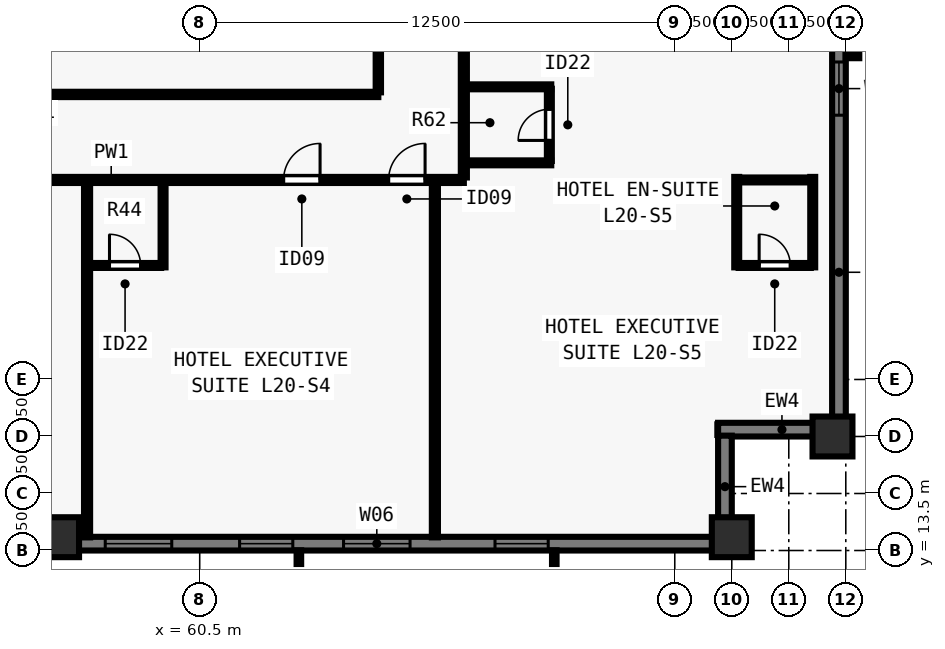
"""IFC4 building model, lengths in metres.
Left out: names, types, materials, properties, quantities, classifications, styles, units other than length and angle.
Written with IfcOpenShell. Run it as: python <this file> out.ifc"""

import sys

from ifc_helpers import new_model, si_unit, direction, frame, frame_2d, origin, origin_2d, place, context, subcontext, project, spatial, rectangle, extrude, element, fill, save


model = new_model("IFC4")
c1 = context("Model", 3, precision=1e-05, world=origin(), true_north=direction((0.0, 1.0)))
c2 = subcontext(c1, "Body", "Model", "MODEL_VIEW")
j1 = project(units=[si_unit("LENGTHUNIT", "METRE"), si_unit("PLANEANGLEUNIT", "RADIAN")], contexts=[c1])
p1 = place(None, origin())
s1 = spatial("IfcSite", under=j1, at=p1, CompositionType="ELEMENT")
p2 = place(p1, origin())
s2 = spatial("IfcBuilding", under=s1, at=p2, CompositionType="ELEMENT")
p3 = place(p2, frame((0.0, 0.0, 76.0)))
s3 = spatial("IfcBuildingStorey", under=s2, at=p3, CompositionType="ELEMENT", Elevation=76.0)
for number, where, z_axis, x_axis in (
    (1, (56.8, 13.85, 0.0), (0.0, 0.0, 1.0), (1.0, 0.0, 0.0)),
    (2, (74.5, 13.85, 0.0), (0.0, 0.0, 1.0), (1.0, 0.0, 0.0)),
    (3, (77.15, 16.5, 0.0), (0.0, 0.0, 1.0), (0.0, 1.0, 0.0)),
):
    element("IfcColumn", number, at=place(p3, frame(where, z_axis=z_axis, x_axis=x_axis)), inside=s3, PredefinedType="COLUMN", context=c2, shape_type="SweptSolid", body=[
        extrude(rectangle(XDim=1.05, YDim=1.05, at=origin_2d()), origin(), (0.0, 0.0, 1.0), 3.5),
    ])
p4 = place(p3, frame((77.32, 44.4, 0.0), z_axis=(0.0, 0.0, 1.0), x_axis=(0.0, -1.0, 0.0)))
e4 = element("IfcWall", 4, at=p4, inside=s3, PredefinedType="SOLIDWALL", context=c2, shape_type="SweptSolid", body=[
    extrude(rectangle(XDim=27.562, YDim=0.36, at=frame_2d((13.781, 0.0))), origin(), (0.0, 0.0, 1.0), 3.28),
])
p5 = place(p4, frame((3.955, 0.0, 0.8)))
e5 = element("IfcOpeningElement", 5, at=p5, cuts=e4, PredefinedType="OPENING", context=c2, shape_type="SweptSolid", body=[
    extrude(rectangle(XDim=1.4, YDim=1.544, at=frame_2d((0.7, 0.772))), frame((0.0, 0.19, 0.0), z_axis=(0.0, -1.0, 0.0), x_axis=(1.0, 0.0, 0.0)), (0.0, 0.0, 1.0), 0.38),
])
p6 = place(p4, frame((7.49, 0.0, 0.8)))
e6 = element("IfcOpeningElement", 6, at=p6, cuts=e4, PredefinedType="OPENING", context=c2, shape_type="SweptSolid", body=[
    extrude(rectangle(XDim=1.75, YDim=1.544, at=frame_2d((0.875, 0.772))), frame((0.0, 0.19, 0.0), z_axis=(0.0, -1.0, 0.0), x_axis=(1.0, 0.0, 0.0)), (0.0, 0.0, 1.0), 0.38),
])
p7 = place(p4, frame((11.426, 0.0, 0.8)))
e7 = element("IfcOpeningElement", 7, at=p7, cuts=e4, PredefinedType="OPENING", context=c2, shape_type="SweptSolid", body=[
    extrude(rectangle(XDim=1.4, YDim=1.544, at=frame_2d((0.7, 0.772))), frame((0.0, 0.19, 0.0), z_axis=(0.0, -1.0, 0.0), x_axis=(1.0, 0.0, 0.0)), (0.0, 0.0, 1.0), 0.38),
])
p8 = place(p4, frame((14.561, 0.0, 0.8)))
e8 = element("IfcOpeningElement", 8, at=p8, cuts=e4, PredefinedType="OPENING", context=c2, shape_type="SweptSolid", body=[
    extrude(rectangle(XDim=1.75, YDim=1.544, at=frame_2d((0.875, 0.772))), frame((0.0, 0.19, 0.0), z_axis=(0.0, -1.0, 0.0), x_axis=(1.0, 0.0, 0.0)), (0.0, 0.0, 1.0), 0.38),
])
p9 = place(p4, frame((18.046, 0.0, 0.8)))
e9 = element("IfcOpeningElement", 9, at=p9, cuts=e4, PredefinedType="OPENING", context=c2, shape_type="SweptSolid", body=[
    extrude(rectangle(XDim=1.4, YDim=1.544, at=frame_2d((0.7, 0.772))), frame((0.0, 0.19, 0.0), z_axis=(0.0, -1.0, 0.0), x_axis=(1.0, 0.0, 0.0)), (0.0, 0.0, 1.0), 0.38),
])
p10 = place(p3, frame((77.5, 16.68, 0.0), z_axis=(0.0, 0.0, 1.0), x_axis=(-1.0, 0.0, 0.0)))
e10 = element("IfcWall", 10, at=p10, inside=s3, PredefinedType="SOLIDWALL", context=c2, shape_type="SweptSolid", body=[
    extrude(rectangle(XDim=3.36, YDim=0.36, at=frame_2d((1.68, 0.0))), origin(), (0.0, 0.0, 1.0), 3.28),
])
p11 = place(p3, frame((74.32, 16.522, 0.0), z_axis=(0.0, 0.0, 1.0), x_axis=(0.0, -1.0, 0.0)))
e11 = element("IfcWall", 11, at=p11, inside=s3, PredefinedType="SOLIDWALL", context=c2, shape_type="SweptSolid", body=[
    extrude(rectangle(XDim=2.684, YDim=0.36, at=frame_2d((1.342, 0.0))), origin(), (0.0, 0.0, 1.0), 3.28),
])
p12 = place(p3, frame((74.5, 13.68, 0.0), z_axis=(0.0, 0.0, 1.0), x_axis=(-1.0, 0.0, 0.0)))
e12 = element("IfcWall", 12, at=p12, inside=s3, PredefinedType="SOLIDWALL", context=c2, shape_type="SweptSolid", body=[
    extrude(rectangle(XDim=44.662, YDim=0.36, at=frame_2d((22.331, 0.0))), origin(), (0.0, 0.0, 1.0), 3.28),
])
p13 = place(p12, frame((4.83, 0.0, 0.8)))
e13 = element("IfcOpeningElement", 13, at=p13, cuts=e12, PredefinedType="OPENING", context=c2, shape_type="SweptSolid", body=[
    extrude(rectangle(XDim=1.4, YDim=1.544, at=frame_2d((0.7, 0.772))), frame((0.0, 0.19, 0.0), z_axis=(0.0, -1.0, 0.0), x_axis=(1.0, 0.0, 0.0)), (0.0, 0.0, 1.0), 0.38),
])
p14 = place(p12, frame((8.465, 0.0, 0.8)))
e14 = element("IfcOpeningElement", 14, at=p14, cuts=e12, PredefinedType="OPENING", context=c2, shape_type="SweptSolid", body=[
    extrude(rectangle(XDim=1.75, YDim=1.544, at=frame_2d((0.875, 0.772))), frame((0.0, 0.19, 0.0), z_axis=(0.0, -1.0, 0.0), x_axis=(1.0, 0.0, 0.0)), (0.0, 0.0, 1.0), 0.38),
])
p15 = place(p12, frame((11.551, 0.0, 0.8)))
e15 = element("IfcOpeningElement", 15, at=p15, cuts=e12, PredefinedType="OPENING", context=c2, shape_type="SweptSolid", body=[
    extrude(rectangle(XDim=1.4, YDim=1.544, at=frame_2d((0.7, 0.772))), frame((0.0, 0.19, 0.0), z_axis=(0.0, -1.0, 0.0), x_axis=(1.0, 0.0, 0.0)), (0.0, 0.0, 1.0), 0.38),
])
p16 = place(p12, frame((14.736, 0.0, 0.8)))
e16 = element("IfcOpeningElement", 16, at=p16, cuts=e12, PredefinedType="OPENING", context=c2, shape_type="SweptSolid", body=[
    extrude(rectangle(XDim=1.75, YDim=1.544, at=frame_2d((0.875, 0.772))), frame((0.0, 0.19, 0.0), z_axis=(0.0, -1.0, 0.0), x_axis=(1.0, 0.0, 0.0)), (0.0, 0.0, 1.0), 0.38),
])
p17 = place(p12, frame((18.721, 0.0, 0.8)))
e17 = element("IfcOpeningElement", 17, at=p17, cuts=e12, PredefinedType="OPENING", context=c2, shape_type="SweptSolid", body=[
    extrude(rectangle(XDim=1.4, YDim=1.544, at=frame_2d((0.7, 0.772))), frame((0.0, 0.19, 0.0), z_axis=(0.0, -1.0, 0.0), x_axis=(1.0, 0.0, 0.0)), (0.0, 0.0, 1.0), 0.38),
])
p18 = place(p12, frame((21.456, 0.0, 0.8)))
e18 = element("IfcOpeningElement", 18, at=p18, cuts=e12, PredefinedType="OPENING", context=c2, shape_type="SweptSolid", body=[
    extrude(rectangle(XDim=1.75, YDim=1.544, at=frame_2d((0.875, 0.772))), frame((0.0, 0.19, 0.0), z_axis=(0.0, -1.0, 0.0), x_axis=(1.0, 0.0, 0.0)), (0.0, 0.0, 1.0), 0.38),
])
p19 = place(p12, frame((24.991, 0.0, 0.8)))
e19 = element("IfcOpeningElement", 19, at=p19, cuts=e12, PredefinedType="OPENING", context=c2, shape_type="SweptSolid", body=[
    extrude(rectangle(XDim=1.4, YDim=1.544, at=frame_2d((0.7, 0.772))), frame((0.0, 0.19, 0.0), z_axis=(0.0, -1.0, 0.0), x_axis=(1.0, 0.0, 0.0)), (0.0, 0.0, 1.0), 0.38),
])
p20 = place(p12, frame((28.177, 0.0, 0.8)))
e20 = element("IfcOpeningElement", 20, at=p20, cuts=e12, PredefinedType="OPENING", context=c2, shape_type="SweptSolid", body=[
    extrude(rectangle(XDim=1.75, YDim=1.544, at=frame_2d((0.875, 0.772))), frame((0.0, 0.19, 0.0), z_axis=(0.0, -1.0, 0.0), x_axis=(1.0, 0.0, 0.0)), (0.0, 0.0, 1.0), 0.38),
])
p21 = place(p12, frame((31.711, 0.0, 0.8)))
e21 = element("IfcOpeningElement", 21, at=p21, cuts=e12, PredefinedType="OPENING", context=c2, shape_type="SweptSolid", body=[
    extrude(rectangle(XDim=1.4, YDim=1.544, at=frame_2d((0.7, 0.772))), frame((0.0, 0.19, 0.0), z_axis=(0.0, -1.0, 0.0), x_axis=(1.0, 0.0, 0.0)), (0.0, 0.0, 1.0), 0.38),
])
p22 = place(p12, frame((34.897, 0.0, 0.8)))
e22 = element("IfcOpeningElement", 22, at=p22, cuts=e12, PredefinedType="OPENING", context=c2, shape_type="SweptSolid", body=[
    extrude(rectangle(XDim=1.75, YDim=1.544, at=frame_2d((0.875, 0.772))), frame((0.0, 0.19, 0.0), z_axis=(0.0, -1.0, 0.0), x_axis=(1.0, 0.0, 0.0)), (0.0, 0.0, 1.0), 0.38),
])
p23 = place(p12, frame((38.432, 0.0, 0.8)))
e23 = element("IfcOpeningElement", 23, at=p23, cuts=e12, PredefinedType="OPENING", context=c2, shape_type="SweptSolid", body=[
    extrude(rectangle(XDim=1.4, YDim=1.544, at=frame_2d((0.7, 0.772))), frame((0.0, 0.19, 0.0), z_axis=(0.0, -1.0, 0.0), x_axis=(1.0, 0.0, 0.0)), (0.0, 0.0, 1.0), 0.38),
])
p24 = place(p3, frame((36.55, 23.25, 0.0), z_axis=(0.0, 0.0, 1.0), x_axis=(1.0, 0.0, 0.0)))
e24 = element("IfcWall", 24, at=p24, inside=s3, PredefinedType="PARTITIONING", context=c2, shape_type="SweptSolid", body=[
    extrude(rectangle(XDim=30.9, YDim=0.16, at=frame_2d((15.45, 0.0))), origin(), (0.0, 0.0, 1.0), 3.28),
])
p25 = place(p24, frame((1.13, 0.0, 0.0)))
e25 = element("IfcOpeningElement", 25, at=p25, cuts=e24, PredefinedType="OPENING", context=c2, shape_type="SweptSolid", body=[
    extrude(rectangle(XDim=0.96, YDim=2.15, at=frame_2d((0.48, 1.075))), frame((0.0, 0.09, 0.0), z_axis=(0.0, -1.0, 0.0), x_axis=(1.0, 0.0, 0.0)), (0.0, 0.0, 1.0), 0.18),
])
p26 = place(p24, frame((6.093, 0.0, 0.0)))
e26 = element("IfcOpeningElement", 26, at=p26, cuts=e24, PredefinedType="OPENING", context=c2, shape_type="SweptSolid", body=[
    extrude(rectangle(XDim=0.96, YDim=2.15, at=frame_2d((0.48, 1.075))), frame((0.0, 0.09, 0.0), z_axis=(0.0, -1.0, 0.0), x_axis=(1.0, 0.0, 0.0)), (0.0, 0.0, 1.0), 0.18),
])
p27 = place(p24, frame((16.125, 0.0, 0.0)))
e27 = element("IfcOpeningElement", 27, at=p27, cuts=e24, PredefinedType="OPENING", context=c2, shape_type="SweptSolid", body=[
    extrude(rectangle(XDim=0.96, YDim=2.15, at=frame_2d((0.48, 1.075))), frame((0.0, 0.09, 0.0), z_axis=(0.0, -1.0, 0.0), x_axis=(1.0, 0.0, 0.0)), (0.0, 0.0, 1.0), 0.18),
])
p28 = place(p24, frame((26.157, 0.0, 0.0)))
e28 = element("IfcOpeningElement", 28, at=p28, cuts=e24, PredefinedType="OPENING", context=c2, shape_type="SweptSolid", body=[
    extrude(rectangle(XDim=0.96, YDim=2.15, at=frame_2d((0.48, 1.075))), frame((0.0, 0.09, 0.0), z_axis=(0.0, -1.0, 0.0), x_axis=(1.0, 0.0, 0.0)), (0.0, 0.0, 1.0), 0.18),
])
p29 = place(p24, frame((28.92, 0.0, 0.0)))
e29 = element("IfcOpeningElement", 29, at=p29, cuts=e24, PredefinedType="OPENING", context=c2, shape_type="SweptSolid", body=[
    extrude(rectangle(XDim=0.96, YDim=2.15, at=frame_2d((0.48, 1.075))), frame((0.0, 0.09, 0.0), z_axis=(0.0, -1.0, 0.0), x_axis=(1.0, 0.0, 0.0)), (0.0, 0.0, 1.0), 0.18),
])
p30 = place(p3, frame((67.45, 23.315, 0.0), z_axis=(0.0, 0.0, 1.0), x_axis=(0.0, 1.0, 0.0)))
e30 = element("IfcWall", 30, at=p30, inside=s3, PredefinedType="PARTITIONING", context=c2, shape_type="SweptSolid", body=[
    extrude(rectangle(XDim=31.37, YDim=0.16, at=frame_2d((15.685, 0.0))), origin(), (0.0, 0.0, 1.0), 3.28),
])
p31 = place(p30, frame((8.474, 0.0, 0.0)))
e31 = element("IfcOpeningElement", 31, at=p31, cuts=e30, PredefinedType="OPENING", context=c2, shape_type="SweptSolid", body=[
    extrude(rectangle(XDim=0.96, YDim=2.15, at=frame_2d((0.48, 1.075))), frame((0.0, 0.09, 0.0), z_axis=(0.0, -1.0, 0.0), x_axis=(1.0, 0.0, 0.0)), (0.0, 0.0, 1.0), 0.18),
])
p32 = place(p30, frame((23.974, 0.0, 0.0)))
e32 = element("IfcOpeningElement", 32, at=p32, cuts=e30, PredefinedType="OPENING", context=c2, shape_type="SweptSolid", body=[
    extrude(rectangle(XDim=0.96, YDim=2.15, at=frame_2d((0.48, 1.075))), frame((0.0, 0.09, 0.0), z_axis=(0.0, -1.0, 0.0), x_axis=(1.0, 0.0, 0.0)), (0.0, 0.0, 1.0), 0.18),
])
p33 = place(p3, frame((38.8, 25.5, 0.0), z_axis=(0.0, 0.0, 1.0), x_axis=(1.0, 0.0, 0.0)))
e33 = element("IfcWall", 33, at=p33, inside=s3, PredefinedType="PARTITIONING", context=c2, shape_type="SweptSolid", body=[
    extrude(rectangle(XDim=26.4, YDim=0.14, at=frame_2d((13.2, 0.0))), origin(), (0.0, 0.0, 1.0), 3.28),
])
p34 = place(p33, frame((2.2, 0.0, 0.0)))
e34 = element("IfcOpeningElement", 34, at=p34, cuts=e33, PredefinedType="OPENING", context=c2, shape_type="SweptSolid", body=[
    extrude(rectangle(XDim=0.96, YDim=2.12, at=frame_2d((0.48, 1.06))), frame((0.0, 0.08, 0.0), z_axis=(0.0, -1.0, 0.0), x_axis=(1.0, 0.0, 0.0)), (0.0, 0.0, 1.0), 0.16),
])
p35 = place(p33, frame((15.2, 0.0, 0.0)))
e35 = element("IfcOpeningElement", 35, at=p35, cuts=e33, PredefinedType="OPENING", context=c2, shape_type="SweptSolid", body=[
    extrude(rectangle(XDim=0.96, YDim=2.12, at=frame_2d((0.48, 1.06))), frame((0.0, 0.08, 0.0), z_axis=(0.0, -1.0, 0.0), x_axis=(1.0, 0.0, 0.0)), (0.0, 0.0, 1.0), 0.16),
])
p36 = place(p3, frame((65.2, 25.555, 0.0), z_axis=(0.0, 0.0, 1.0), x_axis=(0.0, 1.0, 0.0)))
e36 = element("IfcWall", 36, at=p36, inside=s3, PredefinedType="PARTITIONING", context=c2, shape_type="SweptSolid", body=[
    extrude(rectangle(XDim=13.195, YDim=0.14, at=frame_2d((6.598, 0.0))), origin(), (0.0, 0.0, 1.0), 3.28),
])
p37 = place(p36, frame((2.445, 0.0, 0.0)))
e37 = element("IfcOpeningElement", 37, at=p37, cuts=e36, PredefinedType="OPENING", context=c2, shape_type="SweptSolid", body=[
    extrude(rectangle(XDim=0.88, YDim=2.1, at=frame_2d((0.44, 1.05))), frame((0.0, 0.08, 0.0), z_axis=(0.0, -1.0, 0.0), x_axis=(1.0, 0.0, 0.0)), (0.0, 0.0, 1.0), 0.16),
])
p38 = place(p3, frame((57.536, 13.845, 0.0), z_axis=(0.0, 0.0, 1.0), x_axis=(0.0, 1.0, 0.0)))
e38 = element("IfcWall", 38, at=p38, inside=s3, PredefinedType="PARTITIONING", context=c2, shape_type="SweptSolid", body=[
    extrude(rectangle(XDim=9.34, YDim=0.16, at=frame_2d((4.67, 0.0))), origin(), (0.0, 0.0, 1.0), 3.28),
])
p39 = place(p3, frame((59.536, 20.95, 0.0), z_axis=(0.0, 0.0, 1.0), x_axis=(0.0, 1.0, 0.0)))
e39 = element("IfcWall", 39, at=p39, inside=s3, PredefinedType="PLUMBINGWALL", context=c2, shape_type="SweptSolid", body=[
    extrude(rectangle(XDim=2.235, YDim=0.13, at=frame_2d((1.118, 0.0))), origin(), (0.0, 0.0, 1.0), 3.28),
])
p40 = place(p3, frame((57.601, 21.0, 0.0), z_axis=(0.0, 0.0, 1.0), x_axis=(1.0, 0.0, 0.0)))
e40 = element("IfcWall", 40, at=p40, inside=s3, PredefinedType="PLUMBINGWALL", context=c2, shape_type="SweptSolid", body=[
    extrude(rectangle(XDim=1.885, YDim=0.13, at=frame_2d((0.942, 0.0))), origin(), (0.0, 0.0, 1.0), 3.28),
])
p41 = place(p40, frame((0.525, 0.0, 0.0)))
e41 = element("IfcOpeningElement", 41, at=p41, cuts=e40, PredefinedType="OPENING", context=c2, shape_type="SweptSolid", body=[
    extrude(rectangle(XDim=0.82, YDim=2.1, at=frame_2d((0.41, 1.05))), frame((0.0, 0.075, 0.0), z_axis=(0.0, -1.0, 0.0), x_axis=(1.0, 0.0, 0.0)), (0.0, 0.0, 1.0), 0.15),
])
p42 = place(p3, frame((66.688, 13.845, 0.0), z_axis=(0.0, 0.0, 1.0), x_axis=(0.0, 1.0, 0.0)))
e42 = element("IfcWall", 42, at=p42, inside=s3, PredefinedType="PARTITIONING", context=c2, shape_type="SweptSolid", body=[
    extrude(rectangle(XDim=9.34, YDim=0.16, at=frame_2d((4.67, 0.0))), origin(), (0.0, 0.0, 1.0), 2.439),
])
for number, where, z_axis, x_axis in (
    (43, (76.63, 20.95, 0.0), (0.0, 0.0, 1.0), (0.0, 1.0, 0.0)),
    (44, (74.63, 20.95, 0.0), (0.0, 0.0, 1.0), (0.0, 1.0, 0.0)),
):
    element("IfcWall", number, at=place(p3, frame(where, z_axis=z_axis, x_axis=x_axis)), inside=s3, PredefinedType="PLUMBINGWALL", context=c2, shape_type="SweptSolid", body=[
        extrude(rectangle(XDim=2.38, YDim=0.13, at=frame_2d((1.19, 0.0))), origin(), (0.0, 0.0, 1.0), 3.28),
    ])
p43 = place(p3, frame((74.68, 21.0, 0.0), z_axis=(0.0, 0.0, 1.0), x_axis=(1.0, 0.0, 0.0)))
e45 = element("IfcWall", 45, at=p43, inside=s3, PredefinedType="PLUMBINGWALL", context=c2, shape_type="SweptSolid", body=[
    extrude(rectangle(XDim=1.9, YDim=0.13, at=frame_2d((0.95, 0.0))), origin(), (0.0, 0.0, 1.0), 3.28),
])
p44 = place(p43, frame((0.54, 0.0, 0.0)))
e46 = element("IfcOpeningElement", 46, at=p44, cuts=e45, PredefinedType="OPENING", context=c2, shape_type="SweptSolid", body=[
    extrude(rectangle(XDim=0.82, YDim=2.1, at=frame_2d((0.41, 1.05))), frame((0.0, 0.075, 0.0), z_axis=(0.0, -1.0, 0.0), x_axis=(1.0, 0.0, 0.0)), (0.0, 0.0, 1.0), 0.15),
])
p45 = place(p3, frame((74.68, 23.25, 0.0), z_axis=(0.0, 0.0, 1.0), x_axis=(1.0, 0.0, 0.0)))
e47 = element("IfcWall", 47, at=p45, inside=s3, PredefinedType="PLUMBINGWALL", context=c2, shape_type="SweptSolid", body=[
    extrude(rectangle(XDim=1.9, YDim=0.13, at=frame_2d((0.95, 0.0))), origin(), (0.0, 0.0, 1.0), 3.28),
])
p46 = place(p3, frame((67.515, 23.7, 0.0), z_axis=(0.0, 0.0, 1.0), x_axis=(1.0, 0.0, 0.0)))
e48 = element("IfcWall", 48, at=p46, inside=s3, PredefinedType="PLUMBINGWALL", context=c2, shape_type="SweptSolid", body=[
    extrude(rectangle(XDim=2.235, YDim=0.13, at=frame_2d((1.118, 0.0))), origin(), (0.0, 0.0, 1.0), 2.849),
])
p47 = place(p3, frame((67.515, 25.7, 0.0), z_axis=(0.0, 0.0, 1.0), x_axis=(1.0, 0.0, 0.0)))
e49 = element("IfcWall", 49, at=p47, inside=s3, PredefinedType="PLUMBINGWALL", context=c2, shape_type="SweptSolid", body=[
    extrude(rectangle(XDim=2.235, YDim=0.13, at=frame_2d((1.118, 0.0))), origin(), (0.0, 0.0, 1.0), 3.28),
])
p48 = place(p3, frame((69.7, 23.75, 0.0), z_axis=(0.0, 0.0, 1.0), x_axis=(0.0, 1.0, 0.0)))
e50 = element("IfcWall", 50, at=p48, inside=s3, PredefinedType="PLUMBINGWALL", context=c2, shape_type="SweptSolid", body=[
    extrude(rectangle(XDim=1.9, YDim=0.13, at=frame_2d((0.95, 0.0))), origin(), (0.0, 0.0, 1.0), 3.28),
])
p49 = place(p48, frame((0.54, 0.0, 0.0)))
e51 = element("IfcOpeningElement", 51, at=p49, cuts=e50, PredefinedType="OPENING", context=c2, shape_type="SweptSolid", body=[
    extrude(rectangle(XDim=0.82, YDim=2.1, at=frame_2d((0.41, 1.05))), frame((0.0, 0.075, 0.0), z_axis=(0.0, -1.0, 0.0), x_axis=(1.0, 0.0, 0.0)), (0.0, 0.0, 1.0), 0.15),
])
p50 = place(p9, origin())
e52 = element("IfcWindow", 52, at=p50, inside=s3, PartitioningType="SINGLE_PANEL", PredefinedType="WINDOW", context=c2, shape_type="SweptSolid", body=[
    extrude(rectangle(XDim=1.4, YDim=1.544, at=frame_2d((0.7, 0.772))), frame((0.0, -0.05, 0.0), z_axis=(0.0, -1.0, 0.0), x_axis=(1.0, 0.0, 0.0)), (0.0, 0.0, 1.0), 0.06),
])
fill(e9, e52)
p51 = place(p13, origin())
e53 = element("IfcWindow", 53, at=p51, inside=s3, PartitioningType="SINGLE_PANEL", PredefinedType="WINDOW", context=c2, shape_type="SweptSolid", body=[
    extrude(rectangle(XDim=1.4, YDim=1.544, at=frame_2d((0.7, 0.772))), frame((0.0, -0.05, 0.0), z_axis=(0.0, -1.0, 0.0), x_axis=(1.0, 0.0, 0.0)), (0.0, 0.0, 1.0), 0.06),
])
fill(e13, e53)
p52 = place(p14, origin())
e54 = element("IfcWindow", 54, at=p52, inside=s3, PartitioningType="SINGLE_PANEL", PredefinedType="WINDOW", context=c2, shape_type="SweptSolid", body=[
    extrude(rectangle(XDim=1.75, YDim=1.544, at=frame_2d((0.875, 0.772))), frame((0.0, -0.05, 0.0), z_axis=(0.0, -1.0, 0.0), x_axis=(1.0, 0.0, 0.0)), (0.0, 0.0, 1.0), 0.06),
])
fill(e14, e54)
p53 = place(p15, origin())
e55 = element("IfcWindow", 55, at=p53, inside=s3, PartitioningType="SINGLE_PANEL", PredefinedType="WINDOW", context=c2, shape_type="SweptSolid", body=[
    extrude(rectangle(XDim=1.4, YDim=1.544, at=frame_2d((0.7, 0.772))), frame((0.0, -0.05, 0.0), z_axis=(0.0, -1.0, 0.0), x_axis=(1.0, 0.0, 0.0)), (0.0, 0.0, 1.0), 0.06),
])
fill(e15, e55)
p54 = place(p16, origin())
e56 = element("IfcWindow", 56, at=p54, inside=s3, PartitioningType="SINGLE_PANEL", PredefinedType="WINDOW", context=c2, shape_type="SweptSolid", body=[
    extrude(rectangle(XDim=1.75, YDim=1.544, at=frame_2d((0.875, 0.772))), frame((0.0, -0.05, 0.0), z_axis=(0.0, -1.0, 0.0), x_axis=(1.0, 0.0, 0.0)), (0.0, 0.0, 1.0), 0.06),
])
fill(e16, e56)
p55 = place(p41, origin())
e57 = element("IfcDoor", 57, at=p55, inside=s3, OperationType="SINGLE_SWING_LEFT", PredefinedType="DOOR", context=c2, shape_type="SweptSolid", body=[
    extrude(rectangle(XDim=0.82, YDim=2.1, at=frame_2d((0.41, 1.05))), frame((0.0, 0.025, 0.0), z_axis=(0.0, -1.0, 0.0), x_axis=(1.0, 0.0, 0.0)), (0.0, 0.0, 1.0), 0.05),
])
fill(e41, e57)
p56 = place(p28, origin())
e58 = element("IfcDoor", 58, at=p56, inside=s3, OperationType="SINGLE_SWING_RIGHT", PredefinedType="DOOR", context=c2, shape_type="SweptSolid", body=[
    extrude(rectangle(XDim=0.96, YDim=2.15, at=frame_2d((0.48, 1.075))), frame((0.0, 0.025, 0.0), z_axis=(0.0, -1.0, 0.0), x_axis=(1.0, 0.0, 0.0)), (0.0, 0.0, 1.0), 0.05),
])
fill(e28, e58)
p57 = place(p44, origin())
e59 = element("IfcDoor", 59, at=p57, inside=s3, OperationType="SINGLE_SWING_LEFT", PredefinedType="DOOR", context=c2, shape_type="SweptSolid", body=[
    extrude(rectangle(XDim=0.82, YDim=2.1, at=frame_2d((0.41, 1.05))), frame((0.0, 0.025, 0.0), z_axis=(0.0, -1.0, 0.0), x_axis=(1.0, 0.0, 0.0)), (0.0, 0.0, 1.0), 0.05),
])
fill(e46, e59)
p58 = place(p29, origin())
e60 = element("IfcDoor", 60, at=p58, inside=s3, OperationType="SINGLE_SWING_RIGHT", PredefinedType="DOOR", context=c2, shape_type="SweptSolid", body=[
    extrude(rectangle(XDim=0.96, YDim=2.15, at=frame_2d((0.48, 1.075))), frame((0.0, 0.025, 0.0), z_axis=(0.0, -1.0, 0.0), x_axis=(1.0, 0.0, 0.0)), (0.0, 0.0, 1.0), 0.05),
])
fill(e29, e60)
p59 = place(p49, origin())
e61 = element("IfcDoor", 61, at=p59, inside=s3, OperationType="SINGLE_SWING_LEFT", PredefinedType="DOOR", context=c2, shape_type="SweptSolid", body=[
    extrude(rectangle(XDim=0.82, YDim=2.1, at=frame_2d((0.41, 1.05))), frame((0.0, 0.025, 0.0), z_axis=(0.0, -1.0, 0.0), x_axis=(1.0, 0.0, 0.0)), (0.0, 0.0, 1.0), 0.05),
])
fill(e51, e61)
save(model, sys.argv[1])
